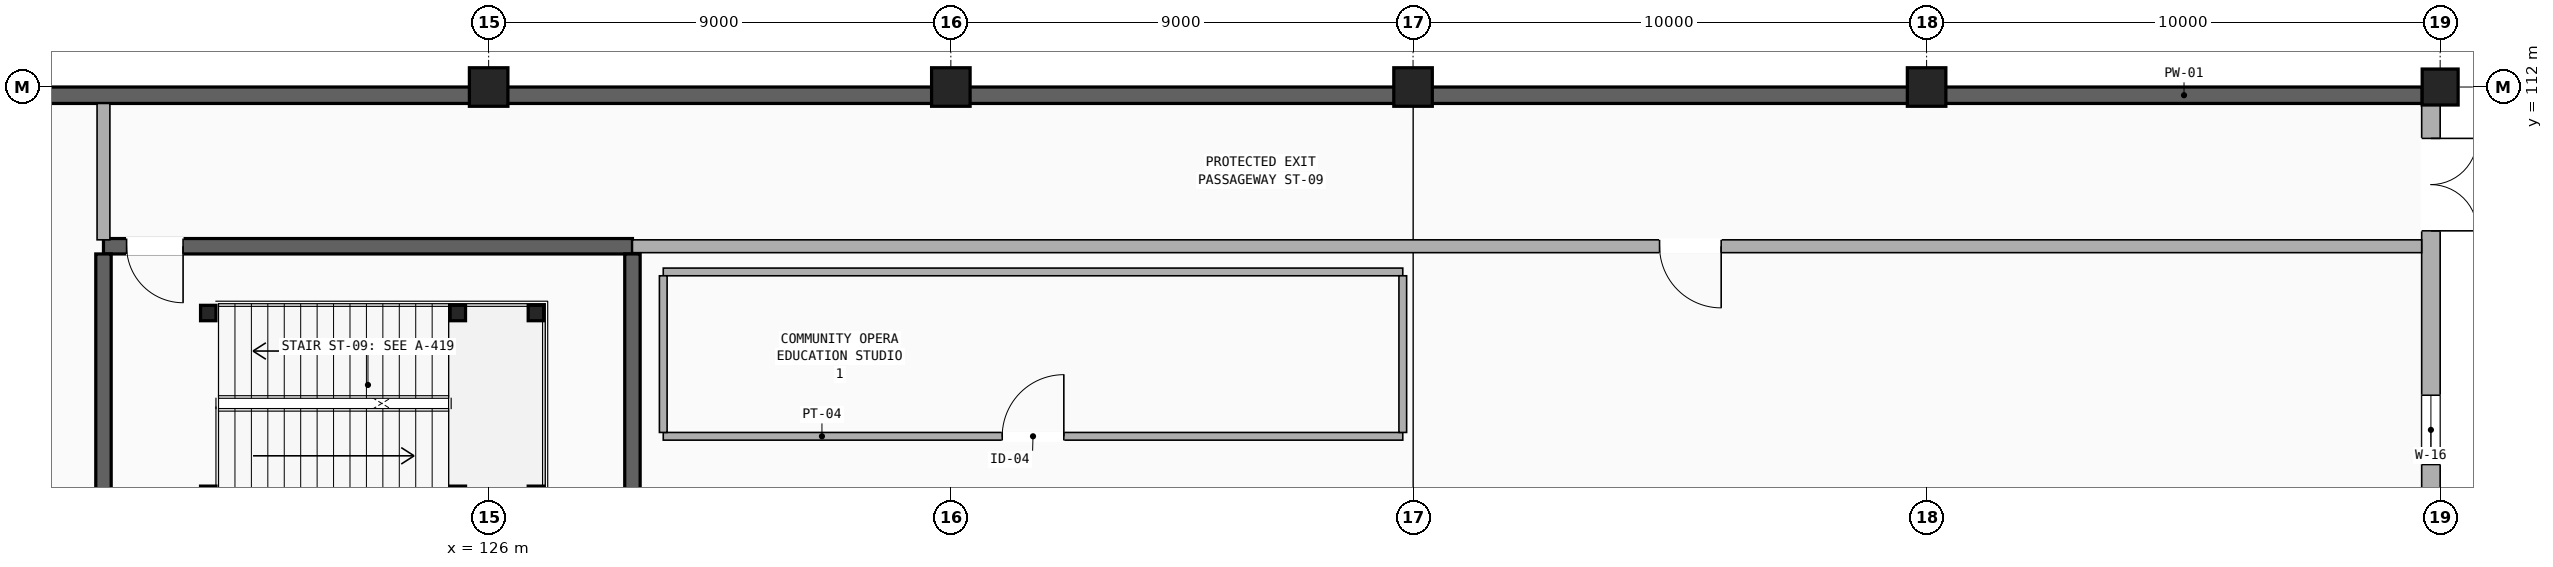
"""IFC4 building model, lengths in metres.
Left out: names, types, materials, properties, quantities, classifications, styles, units other than length and angle.
Written with IfcOpenShell. Run it as: python <this file> out.ifc"""

import sys

from ifc_helpers import new_model, si_unit, direction, frame, frame_2d, origin, origin_2d, place, context, subcontext, project, spatial, rectangle, hollow_rectangle, extrude, element, fill, save


model = new_model("IFC4")
c1 = context("Model", 3, precision=1e-05, world=origin(), true_north=direction((0.0, 1.0)))
c2 = subcontext(c1, "Body", "Model", "MODEL_VIEW")
j1 = project(units=[si_unit("LENGTHUNIT", "METRE"), si_unit("PLANEANGLEUNIT", "RADIAN")], contexts=[c1])
p1 = place(None, origin())
s1 = spatial("IfcSite", under=j1, at=p1, CompositionType="ELEMENT")
p2 = place(p1, origin())
s2 = spatial("IfcBuilding", under=s1, at=p2, CompositionType="ELEMENT")
p3 = place(p2, origin())
s3 = spatial("IfcBuildingStorey", under=s2, at=p3, CompositionType="ELEMENT", Elevation=0.0)
for number, where, z_axis, x_axis in (
    (1, (126.0, 112.0, 0.0), (0.0, 0.0, 1.0), (1.0, 0.0, 0.0)),
    (2, (135.0, 112.0, 0.0), (0.0, 0.0, 1.0), (1.0, 0.0, 0.0)),
    (3, (144.0, 112.0, 0.0), (0.0, 0.0, 1.0), (1.0, 0.0, 0.0)),
    (4, (154.0, 112.0, 0.0), (0.0, 0.0, 1.0), (1.0, 0.0, 0.0)),
):
    element("IfcColumn", number, at=place(p3, frame(where, z_axis=z_axis, x_axis=x_axis)), inside=s3, PredefinedType="COLUMN", context=c2, shape_type="SweptSolid", body=[
        extrude(rectangle(XDim=0.75, YDim=0.75, at=origin_2d()), origin(), (0.0, 0.0, 1.0), 5.1),
    ])
p4 = place(p3, frame((164.0, 112.0, 0.0), z_axis=(0.0, 0.0, 1.0), x_axis=(1.0, 0.0, 0.0)))
e5 = element("IfcColumn", 5, at=p4, inside=s3, PredefinedType="COLUMN", context=c2, shape_type="SweptSolid", body=[
    extrude(rectangle(XDim=0.7, YDim=0.7, at=origin_2d()), origin(), (0.0, 0.0, 1.0), 5.1),
])
p5 = place(p3, frame((118.5, 108.9, 0.0), z_axis=(0.0, 0.0, 1.0), x_axis=(1.0, 0.0, 0.0)))
e6 = element("IfcWall", 6, at=p5, inside=s3, PredefinedType="SHEAR", context=c2, shape_type="SweptSolid", body=[
    extrude(rectangle(XDim=10.3, YDim=0.3, at=frame_2d((5.15, 0.0))), origin(), (0.0, 0.0, 1.0), 5.1),
])
p6 = place(p5, frame((0.45, 0.0, 0.0)))
e7 = element("IfcOpeningElement", 7, at=p6, cuts=e6, PredefinedType="OPENING", context=c2, shape_type="SweptSolid", body=[
    extrude(rectangle(XDim=1.1, YDim=2.2, at=frame_2d((0.55, 1.1))), frame((0.0, 0.16, 0.0), z_axis=(0.0, -1.0, 0.0), x_axis=(1.0, 0.0, 0.0)), (0.0, 0.0, 1.0), 0.32),
])
for number, where, z_axis, x_axis in (
    (8, (118.5, 103.65, 0.0), (0.0, 0.0, 1.0), (0.0, 1.0, 0.0)),
    (9, (128.8, 103.65, 0.0), (0.0, 0.0, 1.0), (0.0, 1.0, 0.0)),
):
    element("IfcWall", number, at=place(p3, frame(where, z_axis=z_axis, x_axis=x_axis)), inside=s3, PredefinedType="SHEAR", context=c2, shape_type="SweptSolid", body=[
        extrude(rectangle(XDim=5.1, YDim=0.3, at=frame_2d((2.55, 0.0))), origin(), (0.0, 0.0, 1.0), 5.1),
    ])
p7 = place(p3, frame((73.775, 111.84, 0.0), z_axis=(0.0, 0.0, 1.0), x_axis=(1.0, 0.0, 0.0)))
e10 = element("IfcWall", 10, at=p7, inside=s3, PredefinedType="SHEAR", context=c2, shape_type="SweptSolid", body=[
    extrude(rectangle(XDim=89.875, YDim=0.32, at=frame_2d((44.938, 0.0))), origin(), (0.0, 0.0, 1.0), 5.1),
])
p8 = place(p3, frame((163.82, 103.35, 0.0), z_axis=(0.0, 0.0, 1.0), x_axis=(0.0, 1.0, 0.0)))
e11 = element("IfcWall", 11, at=p8, inside=s3, PredefinedType="STANDARD", context=c2, shape_type="SweptSolid", body=[
    extrude(rectangle(XDim=8.3, YDim=0.36, at=frame_2d((4.15, 0.0))), origin(), (0.0, 0.0, 1.0), 4.08),
])
p9 = place(p8, frame((5.85, 0.0, 0.0)))
e12 = element("IfcOpeningElement", 12, at=p9, cuts=e11, PredefinedType="OPENING", context=c2, shape_type="SweptSolid", body=[
    extrude(rectangle(XDim=1.8, YDim=2.3, at=frame_2d((0.9, 1.15))), frame((0.0, 0.19, 0.0), z_axis=(0.0, -1.0, 0.0), x_axis=(1.0, 0.0, 0.0)), (0.0, 0.0, 1.0), 0.38),
])
p10 = place(p8, frame((1.3, 0.0, 0.9)))
e13 = element("IfcOpeningElement", 13, at=p10, cuts=e11, PredefinedType="OPENING", context=c2, shape_type="SweptSolid", body=[
    extrude(rectangle(XDim=1.35, YDim=1.85, at=frame_2d((0.675, 0.925))), frame((0.0, 0.19, 0.0), z_axis=(0.0, -1.0, 0.0), x_axis=(1.0, 0.0, 0.0)), (0.0, 0.0, 1.0), 0.38),
])
for number, where, z_axis, x_axis in (
    (14, (120.54, 104.08, 0.0), (0.0, 0.0, 1.0), (1.0, 0.0, 0.0)),
    (15, (120.54, 107.6, 0.0), (0.0, 0.0, 1.0), (1.0, 0.0, 0.0)),
    (16, (125.4, 104.08, 0.0), (0.0, 0.0, 1.0), (1.0, 0.0, 0.0)),
    (17, (125.4, 107.6, 0.0), (0.0, 0.0, 1.0), (1.0, 0.0, 0.0)),
    (18, (126.92, 104.08, 0.0), (0.0, 0.0, 1.0), (1.0, 0.0, 0.0)),
    (19, (126.92, 107.6, 0.0), (0.0, 0.0, 1.0), (1.0, 0.0, 0.0)),
):
    element("IfcColumn", number, at=place(p3, frame(where, z_axis=z_axis, x_axis=x_axis)), inside=s3, PredefinedType="COLUMN", context=c2, shape_type="SweptSolid", body=[
        extrude(hollow_rectangle(XDim=0.3, YDim=0.3, WallThickness=0.016, InnerFilletRadius=0.016, OuterFilletRadius=0.032, at=origin_2d()), origin(), (0.0, 0.0, 1.0), 5.1),
    ])
p11 = place(p3, frame((129.4, 105.2, 0.0), z_axis=(0.0, 0.0, 1.0), x_axis=(1.0, 0.0, 0.0)))
e20 = element("IfcWall", 20, at=p11, inside=s3, PredefinedType="PARTITIONING", context=c2, shape_type="SweptSolid", body=[
    extrude(rectangle(XDim=14.4, YDim=0.15, at=frame_2d((7.2, 0.0))), origin(), (0.0, 0.0, 1.0), 4.13),
])
p12 = place(p11, frame((6.6, 0.0, 0.0)))
e21 = element("IfcOpeningElement", 21, at=p12, cuts=e20, PredefinedType="OPENING", context=c2, shape_type="SweptSolid", body=[
    extrude(rectangle(XDim=1.2, YDim=2.2, at=frame_2d((0.6, 1.1))), frame((0.0, 0.085, 0.0), z_axis=(0.0, -1.0, 0.0), x_axis=(1.0, 0.0, 0.0)), (0.0, 0.0, 1.0), 0.17),
])
p13 = place(p3, frame((129.4, 108.4, 0.0), z_axis=(0.0, 0.0, 1.0), x_axis=(1.0, 0.0, 0.0)))
e22 = element("IfcWall", 22, at=p13, inside=s3, PredefinedType="PARTITIONING", context=c2, shape_type="SweptSolid", body=[
    extrude(rectangle(XDim=14.4, YDim=0.15, at=frame_2d((7.2, 0.0))), origin(), (0.0, 0.0, 1.0), 4.13),
])
p14 = place(p3, frame((129.4, 105.275, 0.0), z_axis=(0.0, 0.0, 1.0), x_axis=(0.0, 1.0, 0.0)))
e23 = element("IfcWall", 23, at=p14, inside=s3, PredefinedType="PARTITIONING", context=c2, shape_type="SweptSolid", body=[
    extrude(rectangle(XDim=3.05, YDim=0.15, at=frame_2d((1.525, 0.0))), origin(), (0.0, 0.0, 1.0), 4.85),
])
p15 = place(p3, frame((143.8, 105.275, 0.0), z_axis=(0.0, 0.0, 1.0), x_axis=(0.0, 1.0, 0.0)))
e24 = element("IfcWall", 24, at=p15, inside=s3, PredefinedType="PARTITIONING", context=c2, shape_type="SweptSolid", body=[
    extrude(rectangle(XDim=3.05, YDim=0.15, at=frame_2d((1.525, 0.0))), origin(), (0.0, 0.0, 1.0), 4.13),
])
p16 = place(p3, frame((128.8, 108.9, 0.0), z_axis=(0.0, 0.0, 1.0), x_axis=(1.0, 0.0, 0.0)))
e25 = element("IfcWall", 25, at=p16, inside=s3, PredefinedType="PARTITIONING", context=c2, shape_type="SweptSolid", body=[
    extrude(rectangle(XDim=34.84, YDim=0.25, at=frame_2d((17.42, 0.0))), origin(), (0.0, 0.0, 1.0), 4.13),
])
p17 = place(p16, frame((20.0, 0.0, 0.0)))
e26 = element("IfcOpeningElement", 26, at=p17, cuts=e25, PredefinedType="OPENING", context=c2, shape_type="SweptSolid", body=[
    extrude(rectangle(XDim=1.2, YDim=2.2, at=frame_2d((0.6, 1.1))), frame((0.0, 0.135, 0.0), z_axis=(0.0, -1.0, 0.0), x_axis=(1.0, 0.0, 0.0)), (0.0, 0.0, 1.0), 0.27),
])
p18 = place(p3, frame((118.5, 111.68, 0.0), z_axis=(0.0, 0.0, 1.0), x_axis=(0.0, -1.0, 0.0)))
e27 = element("IfcWall", 27, at=p18, inside=s3, PredefinedType="PARTITIONING", context=c2, shape_type="SweptSolid", body=[
    extrude(rectangle(XDim=2.655, YDim=0.25, at=frame_2d((1.328, 0.0))), origin(), (0.0, 0.0, 1.0), 4.08),
])
p19 = place(p9, frame((1.8, 0.0, 0.0), z_axis=(0.0, 0.0, 1.0), x_axis=(-1.0, 0.0, 0.0)))
e28 = element("IfcDoor", 28, at=p19, inside=s3, OperationType="DOUBLE_DOOR_SINGLE_SWING", PredefinedType="DOOR", context=c2, shape_type="SweptSolid", body=[
    extrude(rectangle(XDim=1.8, YDim=2.3, at=frame_2d((0.9, 1.15))), frame((0.0, 0.025, 0.0), z_axis=(0.0, -1.0, 0.0), x_axis=(1.0, 0.0, 0.0)), (0.0, 0.0, 1.0), 0.05),
])
fill(e12, e28)
p20 = place(p10, origin())
e29 = element("IfcWindow", 29, at=p20, inside=s3, PartitioningType="SINGLE_PANEL", PredefinedType="WINDOW", context=c2, shape_type="SweptSolid", body=[
    extrude(rectangle(XDim=1.35, YDim=1.85, at=frame_2d((0.675, 0.925))), frame((0.0, 0.03, 0.0), z_axis=(0.0, -1.0, 0.0), x_axis=(1.0, 0.0, 0.0)), (0.0, 0.0, 1.0), 0.06),
])
fill(e13, e29)
p21 = place(p6, frame((1.1, 0.0, 0.0), z_axis=(0.0, 0.0, 1.0), x_axis=(-1.0, 0.0, 0.0)))
e30 = element("IfcDoor", 30, at=p21, inside=s3, OperationType="SINGLE_SWING_LEFT", PredefinedType="DOOR", context=c2, shape_type="SweptSolid", body=[
    extrude(rectangle(XDim=1.1, YDim=2.2, at=frame_2d((0.55, 1.1))), frame((0.0, 0.025, 0.0), z_axis=(0.0, -1.0, 0.0), x_axis=(1.0, 0.0, 0.0)), (0.0, 0.0, 1.0), 0.05),
])
fill(e7, e30)
p22 = place(p12, origin())
e31 = element("IfcDoor", 31, at=p22, inside=s3, OperationType="SINGLE_SWING_RIGHT", PredefinedType="DOOR", context=c2, shape_type="SweptSolid", body=[
    extrude(rectangle(XDim=1.2, YDim=2.2, at=frame_2d((0.6, 1.1))), frame((0.0, 0.025, 0.0), z_axis=(0.0, -1.0, 0.0), x_axis=(1.0, 0.0, 0.0)), (0.0, 0.0, 1.0), 0.05),
])
fill(e21, e31)
p23 = place(p17, frame((1.2, 0.0, 0.0), z_axis=(0.0, 0.0, 1.0), x_axis=(-1.0, 0.0, 0.0)))
e32 = element("IfcDoor", 32, at=p23, inside=s3, OperationType="SINGLE_SWING_LEFT", PredefinedType="DOOR", context=c2, shape_type="SweptSolid", body=[
    extrude(rectangle(XDim=1.2, YDim=2.2, at=frame_2d((0.6, 1.1))), frame((0.0, 0.025, 0.0), z_axis=(0.0, -1.0, 0.0), x_axis=(1.0, 0.0, 0.0)), (0.0, 0.0, 1.0), 0.05),
])
fill(e26, e32)
save(model, sys.argv[1])
